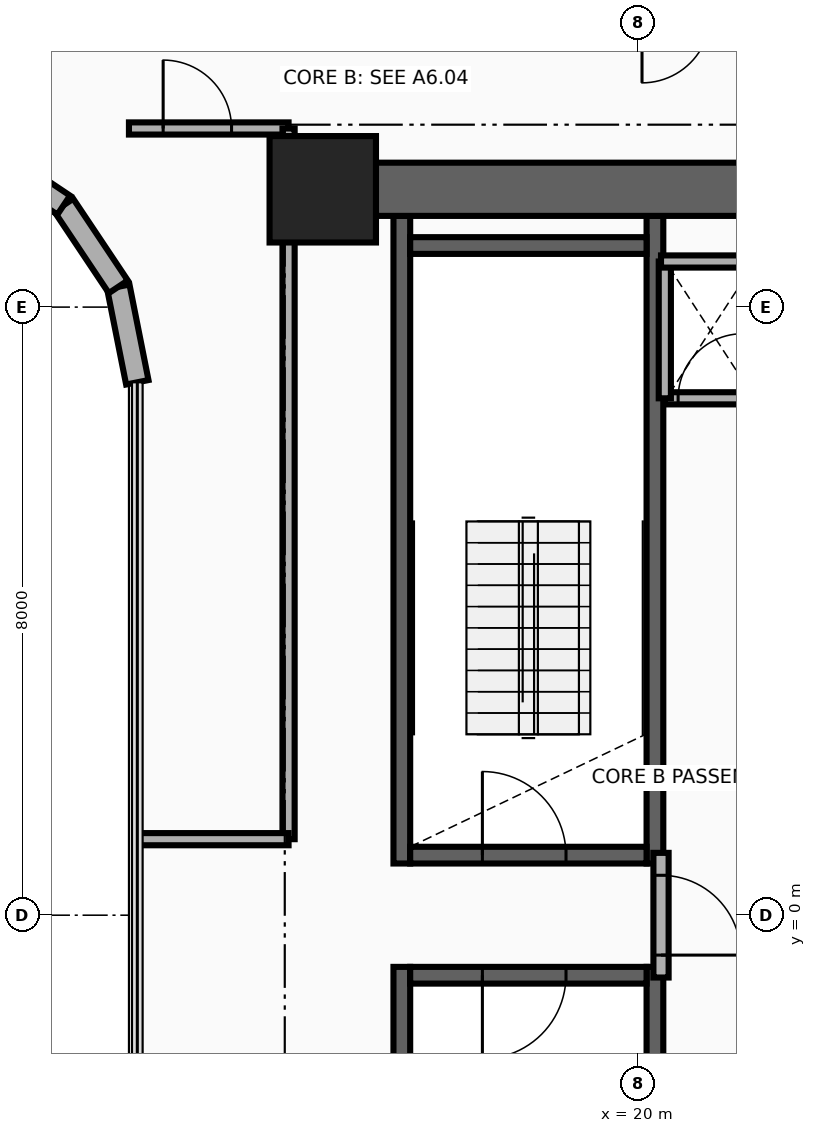
"""IFC4 building model, lengths in metres.
Left out: names, types, materials, properties, quantities, classifications, styles, units other than length and angle.
Written with IfcOpenShell. Run it as: python <this file> out.ifc"""

import sys

from ifc_helpers import new_model, si_unit, direction, frame, frame_2d, origin, origin_2d, place, context, subcontext, project, spatial, rectangle, extrude, source, transform, mapped, element, fill, save


model = new_model("IFC4")
c1 = context("Model", 3, precision=1e-05, world=origin(), true_north=direction((0.0, 1.0)))
c2 = subcontext(c1, "Body", "Model", "MODEL_VIEW")
j1 = project(units=[si_unit("LENGTHUNIT", "METRE"), si_unit("PLANEANGLEUNIT", "RADIAN")], contexts=[c1])
p1 = place(None, origin())
s1 = spatial("IfcSite", under=j1, at=p1, CompositionType="ELEMENT")
p2 = place(p1, origin())
s2 = spatial("IfcBuilding", under=s1, at=p2, CompositionType="ELEMENT")
p3 = place(p2, frame((0.0, 0.0, 77.8)))
s3 = spatial("IfcBuildingStorey", under=s2, at=p3, CompositionType="ELEMENT", Elevation=77.8)
for number, where, z_axis, x_axis in (
    (1, (16.89, 0.68, 0.0), (0.0, 0.0, 1.0), (0.0, 1.0, 0.0)),
    (2, (20.22, 0.68, 0.0), (0.0, 0.0, 1.0), (0.0, 1.0, 0.0)),
):
    element("IfcWall", number, at=place(p3, frame(where, z_axis=z_axis, x_axis=x_axis)), inside=s3, PredefinedType="SHEAR", context=c2, shape_type="SweptSolid", body=[
        extrude(rectangle(XDim=8.52, YDim=0.22, at=frame_2d((4.26, 0.0))), origin(), (0.0, 0.0, 1.0), 3.46),
    ])
p4 = place(p3, frame((17.0, 0.79, 0.0), z_axis=(0.0, 0.0, 1.0), x_axis=(1.0, 0.0, 0.0)))
e3 = element("IfcWall", 3, at=p4, inside=s3, PredefinedType="SHEAR", context=c2, shape_type="SweptSolid", body=[
    extrude(rectangle(XDim=3.11, YDim=0.22, at=frame_2d((1.555, 0.0))), origin(), (0.0, 0.0, 1.0), 3.46),
])
p5 = place(p4, frame((0.95, 0.0, 0.0)))
e4 = element("IfcOpeningElement", 4, at=p5, cuts=e3, PredefinedType="OPENING", context=c2, shape_type="SweptSolid", body=[
    extrude(rectangle(XDim=1.1, YDim=2.15, at=frame_2d((0.55, 1.075))), frame((0.0, 0.125, 0.0), z_axis=(0.0, -1.0, 0.0), x_axis=(1.0, 0.0, 0.0)), (0.0, 0.0, 1.0), 0.25),
])
p6 = place(p3, frame((17.0, 8.81, 0.0), z_axis=(0.0, 0.0, 1.0), x_axis=(1.0, 0.0, 0.0)))
e5 = element("IfcWall", 5, at=p6, inside=s3, PredefinedType="SHEAR", context=c2, shape_type="SweptSolid", body=[
    extrude(rectangle(XDim=3.11, YDim=0.22, at=frame_2d((1.555, 0.0))), origin(), (0.0, 0.0, 1.0), 3.46),
])
for number, where, z_axis, x_axis in (
    (6, (16.89, -9.2, 0.0), (0.0, 0.0, 1.0), (0.0, 1.0, 0.0)),
    (7, (20.22, -9.2, 0.0), (0.0, 0.0, 1.0), (0.0, 1.0, 0.0)),
):
    element("IfcWall", number, at=place(p3, frame(where, z_axis=z_axis, x_axis=x_axis)), inside=s3, PredefinedType="SHEAR", context=c2, shape_type="SweptSolid", body=[
        extrude(rectangle(XDim=8.52, YDim=0.22, at=frame_2d((4.26, 0.0))), origin(), (0.0, 0.0, 1.0), 3.46),
    ])
p7 = place(p3, frame((17.0, -0.79, 0.0), z_axis=(0.0, 0.0, 1.0), x_axis=(1.0, 0.0, 0.0)))
e8 = element("IfcWall", 8, at=p7, inside=s3, PredefinedType="SHEAR", context=c2, shape_type="SweptSolid", body=[
    extrude(rectangle(XDim=3.11, YDim=0.22, at=frame_2d((1.555, 0.0))), origin(), (0.0, 0.0, 1.0), 3.46),
])
p8 = place(p7, frame((0.95, 0.0, 0.0)))
e9 = element("IfcOpeningElement", 9, at=p8, cuts=e8, PredefinedType="OPENING", context=c2, shape_type="SweptSolid", body=[
    extrude(rectangle(XDim=1.1, YDim=2.15, at=frame_2d((0.55, 1.075))), frame((0.0, 0.125, 0.0), z_axis=(0.0, -1.0, 0.0), x_axis=(1.0, 0.0, 0.0)), (0.0, 0.0, 1.0), 0.25),
])
p9 = place(p3, frame((15.85, 9.55, 0.0), z_axis=(0.0, 0.0, 1.0), x_axis=(1.0, 0.0, 0.0)))
e10 = element("IfcWall", 10, at=p9, inside=s3, PredefinedType="SHEAR", context=c2, shape_type="SweptSolid", body=[
    extrude(rectangle(XDim=9.0, YDim=0.7, at=frame_2d((4.5, 0.0))), origin(), (0.0, 0.0, 1.0), 3.46),
])
m1 = source(origin(), c2, "Body", "SweptSolid", [
    extrude(rectangle(XDim=1.4, YDim=1.4, at=origin_2d()), origin(), (0.0, 0.0, 1.0), 3.7),
])
p10 = place(p3, frame((15.85, 9.55, 0.0), z_axis=(0.0, 0.0, 1.0), x_axis=(1.0, 0.0, 0.0)))
e11 = element("IfcColumn", 11, at=p10, inside=s3, PredefinedType="COLUMN", context=c2, shape_type="MappedRepresentation", body=[
    mapped(m1, transform((0.0, 0.0, 0.0), x_axis=(1.0, 0.0, 0.0), y_axis=(0.0, 1.0, 0.0), z_axis=(0.0, 0.0, 1.0), scale=1.0)),
])
p11 = place(p3, frame((13.41, 7.011, 0.0), z_axis=(0.0, 0.0, 1.0), x_axis=(-0.195090163074, 0.980785312019, 0.0)))
e12 = element("IfcWall", 12, at=p11, inside=s3, PredefinedType="SOLIDWALL", context=c2, shape_type="SweptSolid", body=[
    extrude(rectangle(XDim=1.281, YDim=0.3, at=frame_2d((0.641, 0.0))), origin(), (0.0, 0.0, 1.0), 3.46),
])
for number, where, z_axis, x_axis in (
    (13, (13.16, 8.268, 0.0), (0.0, 0.0, 1.0), (-0.556, 0.831, 0.0)),
    (14, (12.442, 9.342, 0.0), (0.0, 0.0, 1.0), (-0.831, 0.556, 0.0)),
):
    element("IfcWall", number, at=place(p3, frame(where, z_axis=z_axis, x_axis=x_axis)), inside=s3, PredefinedType="SOLIDWALL", context=c2, shape_type="SweptSolid", body=[
        extrude(rectangle(XDim=1.292, YDim=0.3, at=frame_2d((0.646, 0.0))), origin(), (0.0, 0.0, 1.0), 3.46),
    ])
p12 = place(p3, frame((20.3, -0.82, 0.0), z_axis=(0.0, 0.0, 1.0), x_axis=(0.0, 1.0, 0.0)))
e15 = element("IfcWall", 15, at=p12, inside=s3, PredefinedType="PARTITIONING", context=c2, shape_type="SweptSolid", body=[
    extrude(rectangle(XDim=1.64, YDim=0.2, at=frame_2d((0.82, 0.0))), origin(), (0.0, 0.0, 1.0), 3.46),
])
p13 = place(p12, frame((0.295, 0.0, 0.0)))
e16 = element("IfcOpeningElement", 16, at=p13, cuts=e15, PredefinedType="OPENING", context=c2, shape_type="SweptSolid", body=[
    extrude(rectangle(XDim=1.05, YDim=2.15, at=frame_2d((0.525, 1.075))), frame((0.0, 0.115, 0.0), z_axis=(0.0, -1.0, 0.0), x_axis=(1.0, 0.0, 0.0)), (0.0, 0.0, 1.0), 0.23),
])
p14 = place(p3, frame((20.35, 6.8, 0.0), z_axis=(0.0, 0.0, 1.0), x_axis=(1.0, 0.0, 0.0)))
e17 = element("IfcWall", 17, at=p14, inside=s3, PredefinedType="PARTITIONING", context=c2, shape_type="SweptSolid", body=[
    extrude(rectangle(XDim=1.2, YDim=0.16, at=frame_2d((0.6, 0.0))), origin(), (0.0, 0.0, 1.0), 3.46),
])
p15 = place(p14, frame((0.175, 0.0, 0.0)))
e18 = element("IfcOpeningElement", 18, at=p15, cuts=e17, PredefinedType="OPENING", context=c2, shape_type="SweptSolid", body=[
    extrude(rectangle(XDim=0.85, YDim=2.05, at=frame_2d((0.425, 1.025))), frame((0.0, 0.095, 0.0), z_axis=(0.0, -1.0, 0.0), x_axis=(1.0, 0.0, 0.0)), (0.0, 0.0, 1.0), 0.19),
])
p16 = place(p3, frame((20.35, 6.8, 0.0), z_axis=(0.0, 0.0, 1.0), x_axis=(0.0, 1.0, 0.0)))
e19 = element("IfcWall", 19, at=p16, inside=s3, PredefinedType="PARTITIONING", context=c2, shape_type="SweptSolid", body=[
    extrude(rectangle(XDim=1.8, YDim=0.16, at=frame_2d((0.9, 0.0))), origin(), (0.0, 0.0, 1.0), 3.46),
])
p17 = place(p3, frame((20.3, 8.6, 0.0), z_axis=(0.0, 0.0, 1.0), x_axis=(1.0, 0.0, 0.0)))
e20 = element("IfcWall", 20, at=p17, inside=s3, PredefinedType="PARTITIONING", context=c2, shape_type="SweptSolid", body=[
    extrude(rectangle(XDim=1.82, YDim=0.16, at=frame_2d((0.91, 0.0))), origin(), (0.0, 0.0, 1.0), 3.46),
])
p18 = place(p3, frame((13.3, 10.35, 0.0), z_axis=(0.0, 0.0, 1.0), x_axis=(1.0, 0.0, 0.0)))
e21 = element("IfcWall", 21, at=p18, inside=s3, PredefinedType="PARTITIONING", context=c2, shape_type="SweptSolid", body=[
    extrude(rectangle(XDim=2.1, YDim=0.16, at=frame_2d((1.05, 0.0))), origin(), (0.0, 0.0, 1.0), 2.583),
])
p19 = place(p18, frame((0.45, 0.0, 0.0)))
e22 = element("IfcOpeningElement", 22, at=p19, cuts=e21, PredefinedType="OPENING", context=c2, shape_type="SweptSolid", body=[
    extrude(rectangle(XDim=0.9, YDim=2.1, at=frame_2d((0.45, 1.05))), frame((0.0, 0.095, 0.0), z_axis=(0.0, -1.0, 0.0), x_axis=(1.0, 0.0, 0.0)), (0.0, 0.0, 1.0), 0.19),
])
p20 = place(p3, frame((15.4, 1.0, 0.0), z_axis=(0.0, 0.0, 1.0), x_axis=(0.0, 1.0, 0.0)))
e23 = element("IfcWall", 23, at=p20, inside=s3, PredefinedType="PARTITIONING", context=c2, shape_type="SweptSolid", body=[
    extrude(rectangle(XDim=9.35, YDim=0.16, at=frame_2d((4.675, 0.0))), origin(), (0.0, 0.0, 1.0), 2.245),
])
p21 = place(p3, frame((13.41, 1.0, 0.0), z_axis=(0.0, 0.0, 1.0), x_axis=(1.0, 0.0, 0.0)))
e24 = element("IfcWall", 24, at=p21, inside=s3, PredefinedType="PARTITIONING", context=c2, shape_type="SweptSolid", body=[
    extrude(rectangle(XDim=1.99, YDim=0.16, at=frame_2d((0.995, 0.0))), origin(), (0.0, 0.0, 1.0), 2.245),
])
p22 = place(p13, frame((1.05, 0.0, 0.0), z_axis=(0.0, 0.0, 1.0), x_axis=(-1.0, 0.0, 0.0)))
e25 = element("IfcDoor", 25, at=p22, inside=s3, OperationType="SINGLE_SWING_LEFT", PredefinedType="DOOR", context=c2, shape_type="SweptSolid", body=[
    extrude(rectangle(XDim=1.05, YDim=2.15, at=frame_2d((0.525, 1.075))), frame((0.0, 0.025, 0.0), z_axis=(0.0, -1.0, 0.0), x_axis=(1.0, 0.0, 0.0)), (0.0, 0.0, 1.0), 0.05),
])
fill(e16, e25)
p23 = place(p5, origin())
e26 = element("IfcDoor", 26, at=p23, inside=s3, OperationType="SINGLE_SWING_RIGHT", PredefinedType="DOOR", context=c2, shape_type="SweptSolid", body=[
    extrude(rectangle(XDim=1.1, YDim=2.15, at=frame_2d((0.55, 1.075))), frame((0.0, 0.025, 0.0), z_axis=(0.0, -1.0, 0.0), x_axis=(1.0, 0.0, 0.0)), (0.0, 0.0, 1.0), 0.05),
])
fill(e4, e26)
p24 = place(p8, frame((1.1, 0.0, 0.0), z_axis=(0.0, 0.0, 1.0), x_axis=(-1.0, 0.0, 0.0)))
e27 = element("IfcDoor", 27, at=p24, inside=s3, OperationType="SINGLE_SWING_LEFT", PredefinedType="DOOR", context=c2, shape_type="SweptSolid", body=[
    extrude(rectangle(XDim=1.1, YDim=2.15, at=frame_2d((0.55, 1.075))), frame((0.0, 0.025, 0.0), z_axis=(0.0, -1.0, 0.0), x_axis=(1.0, 0.0, 0.0)), (0.0, 0.0, 1.0), 0.05),
])
fill(e9, e27)
p25 = place(p15, origin())
e28 = element("IfcDoor", 28, at=p25, inside=s3, OperationType="SINGLE_SWING_RIGHT", PredefinedType="DOOR", context=c2, shape_type="SweptSolid", body=[
    extrude(rectangle(XDim=0.85, YDim=2.05, at=frame_2d((0.425, 1.025))), frame((0.0, 0.025, 0.0), z_axis=(0.0, -1.0, 0.0), x_axis=(1.0, 0.0, 0.0)), (0.0, 0.0, 1.0), 0.05),
])
fill(e18, e28)
p26 = place(p19, origin())
e29 = element("IfcDoor", 29, at=p26, inside=s3, OperationType="SINGLE_SWING_LEFT", PredefinedType="DOOR", context=c2, shape_type="SweptSolid", body=[
    extrude(rectangle(XDim=0.9, YDim=2.1, at=frame_2d((0.45, 1.05))), frame((0.0, 0.025, 0.0), z_axis=(0.0, -1.0, 0.0), x_axis=(1.0, 0.0, 0.0)), (0.0, 0.0, 1.0), 0.05),
])
fill(e22, e29)
save(model, sys.argv[1])
